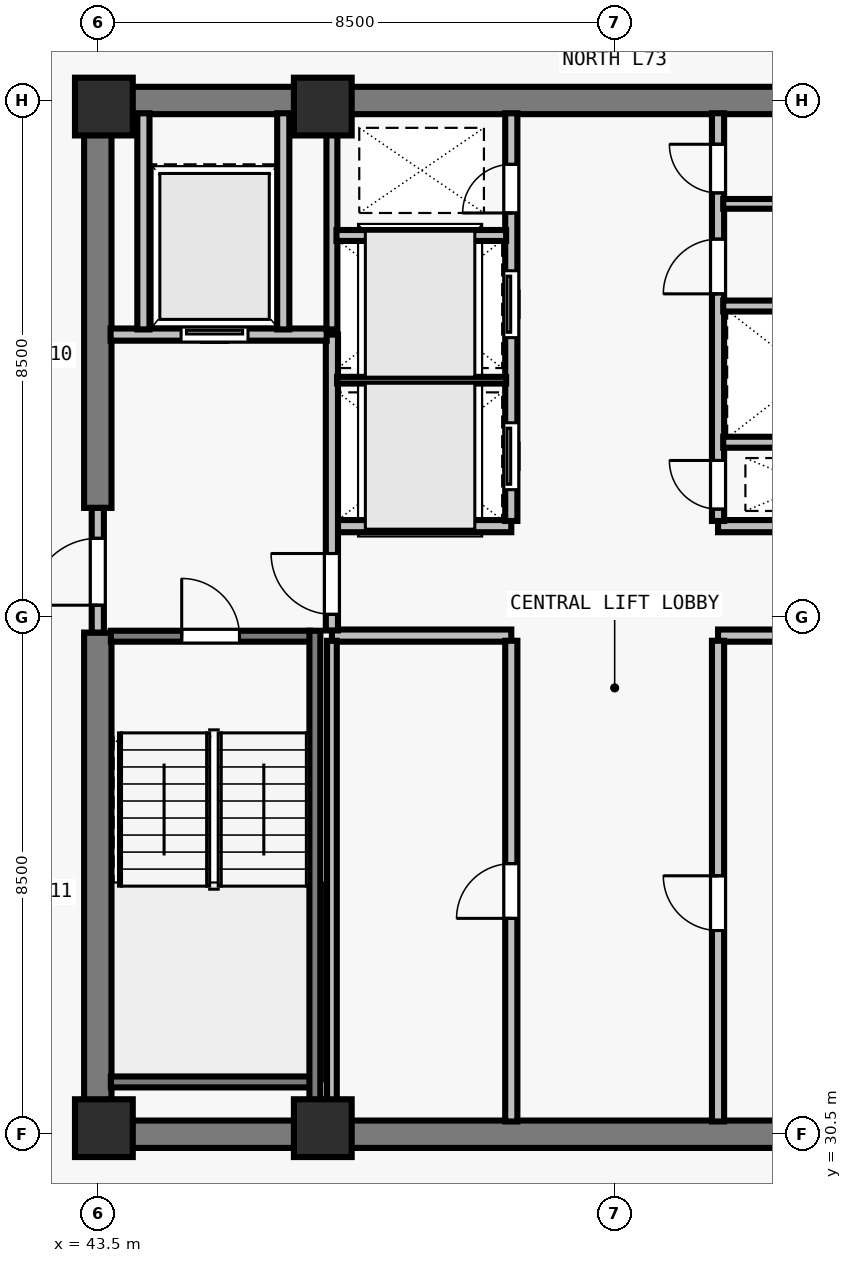
"""IFC4 building model, lengths in metres.
Left out: names, types, materials, properties, quantities, classifications, styles, units other than length and angle.
Written with IfcOpenShell. Run it as: python <this file> out.ifc"""

import sys

from ifc_helpers import new_model, si_unit, direction, frame, frame_2d, origin, origin_2d, place, context, subcontext, project, spatial, rectangle, extrude, element, fill, save


model = new_model("IFC4")
c1 = context("Model", 3, precision=1e-05, world=origin(), true_north=direction((0.0, 1.0)))
c2 = subcontext(c1, "Body", "Model", "MODEL_VIEW")
j1 = project(units=[si_unit("LENGTHUNIT", "METRE"), si_unit("PLANEANGLEUNIT", "RADIAN")], contexts=[c1])
p1 = place(None, origin())
s1 = spatial("IfcSite", under=j1, at=p1, CompositionType="ELEMENT")
p2 = place(p1, origin())
s2 = spatial("IfcBuilding", under=s1, at=p2, CompositionType="ELEMENT")
p3 = place(p2, frame((0.0, 0.0, 265.5)))
s3 = spatial("IfcBuildingStorey", under=s2, at=p3, CompositionType="ELEMENT", Elevation=265.5)
for number, where, z_axis, x_axis in (
    (1, (43.6, 30.6, 0.0), (0.0, 0.0, 1.0), (1.0, 0.0, 0.0)),
    (2, (47.2, 30.6, 0.0), (0.0, 0.0, 1.0), (1.0, 0.0, 0.0)),
    (3, (43.6, 47.4, 0.0), (0.0, 0.0, 1.0), (1.0, 0.0, 0.0)),
    (4, (47.2, 47.4, 0.0), (0.0, 0.0, 1.0), (1.0, 0.0, 0.0)),
):
    element("IfcColumn", number, at=place(p3, frame(where, z_axis=z_axis, x_axis=x_axis)), inside=s3, PredefinedType="COLUMN", context=c2, shape_type="SweptSolid", body=[
        extrude(rectangle(XDim=0.95, YDim=0.95, at=origin_2d()), origin(), (0.0, 0.0, 1.0), 3.5),
    ])
for number, where, z_axis, x_axis in (
    (5, (43.275, 30.5, 0.0), (0.0, 0.0, 1.0), (1.0, 0.0, 0.0)),
    (6, (43.275, 47.5, 0.0), (0.0, 0.0, 1.0), (1.0, 0.0, 0.0)),
):
    element("IfcWall", number, at=place(p3, frame(where, z_axis=z_axis, x_axis=x_axis)), inside=s3, PredefinedType="SHEAR", context=c2, shape_type="SweptSolid", body=[
        extrude(rectangle(XDim=17.45, YDim=0.45, at=frame_2d((8.725, 0.0))), origin(), (0.0, 0.0, 1.0), 3.29),
    ])
p4 = place(p3, frame((43.5, 30.715, 0.0), z_axis=(0.0, 0.0, 1.0), x_axis=(0.0, 1.0, 0.0)))
e7 = element("IfcWall", 7, at=p4, inside=s3, PredefinedType="SHEAR", context=c2, shape_type="SweptSolid", body=[
    extrude(rectangle(XDim=8.035, YDim=0.45, at=frame_2d((4.018, 0.0))), origin(), (0.0, 0.0, 1.0), 3.29),
])
p5 = place(p3, frame((43.5, 40.8, 0.0), z_axis=(0.0, 0.0, 1.0), x_axis=(0.0, 1.0, 0.0)))
e8 = element("IfcWall", 8, at=p5, inside=s3, PredefinedType="SHEAR", context=c2, shape_type="SweptSolid", body=[
    extrude(rectangle(XDim=6.485, YDim=0.45, at=frame_2d((3.242, 0.0))), origin(), (0.0, 0.0, 1.0), 3.29),
])
for number, where, z_axis, x_axis in (
    (9, (47.35, 38.7, 0.0), (0.0, 0.0, 1.0), (1.0, 0.0, 0.0)),
    (10, (47.35, 40.5, 0.0), (0.0, 0.0, 1.0), (1.0, 0.0, 0.0)),
    (11, (53.7, 38.7, 0.0), (0.0, 0.0, 1.0), (1.0, 0.0, 0.0)),
    (12, (53.7, 40.5, 0.0), (0.0, 0.0, 1.0), (1.0, 0.0, 0.0)),
):
    element("IfcWall", number, at=place(p3, frame(where, z_axis=z_axis, x_axis=x_axis)), inside=s3, PredefinedType="SOLIDWALL", context=c2, shape_type="SweptSolid", body=[
        extrude(rectangle(XDim=2.95, YDim=0.2, at=frame_2d((1.475, 0.0))), origin(), (0.0, 0.0, 1.0), 3.29),
    ])
p6 = place(p3, frame((50.3, 30.71, 0.0), z_axis=(0.0, 0.0, 1.0), x_axis=(0.0, 1.0, 0.0)))
e13 = element("IfcWall", 13, at=p6, inside=s3, PredefinedType="SOLIDWALL", context=c2, shape_type="SweptSolid", body=[
    extrude(rectangle(XDim=7.905, YDim=0.2, at=frame_2d((3.953, 0.0))), origin(), (0.0, 0.0, 1.0), 3.29),
])
p7 = place(p6, frame((3.34, 0.0, 0.0)))
e14 = element("IfcOpeningElement", 14, at=p7, cuts=e13, PredefinedType="OPENING", context=c2, shape_type="SweptSolid", body=[
    extrude(rectangle(XDim=0.9, YDim=2.12, at=frame_2d((0.45, 1.06))), frame((0.0, 0.11, 0.0), z_axis=(0.0, -1.0, 0.0), x_axis=(1.0, 0.0, 0.0)), (0.0, 0.0, 1.0), 0.22),
])
p8 = place(p3, frame((53.7, 30.71, 0.0), z_axis=(0.0, 0.0, 1.0), x_axis=(0.0, 1.0, 0.0)))
e15 = element("IfcWall", 15, at=p8, inside=s3, PredefinedType="SOLIDWALL", context=c2, shape_type="SweptSolid", body=[
    extrude(rectangle(XDim=7.905, YDim=0.2, at=frame_2d((3.953, 0.0))), origin(), (0.0, 0.0, 1.0), 3.29),
])
p9 = place(p8, frame((3.14, 0.0, 0.0)))
e16 = element("IfcOpeningElement", 16, at=p9, cuts=e15, PredefinedType="OPENING", context=c2, shape_type="SweptSolid", body=[
    extrude(rectangle(XDim=0.9, YDim=2.12, at=frame_2d((0.45, 1.06))), frame((0.0, 0.11, 0.0), z_axis=(0.0, -1.0, 0.0), x_axis=(1.0, 0.0, 0.0)), (0.0, 0.0, 1.0), 0.22),
])
p10 = place(p3, frame((50.3, 40.585, 0.0), z_axis=(0.0, 0.0, 1.0), x_axis=(0.0, 1.0, 0.0)))
e17 = element("IfcWall", 17, at=p10, inside=s3, PredefinedType="SOLIDWALL", context=c2, shape_type="SweptSolid", body=[
    extrude(rectangle(XDim=6.705, YDim=0.2, at=frame_2d((3.353, 0.0))), origin(), (0.0, 0.0, 1.0), 3.29),
])
p11 = place(p10, frame((0.515, 0.0, 0.0)))
e18 = element("IfcOpeningElement", 18, at=p11, cuts=e17, PredefinedType="OPENING", context=c2, shape_type="SweptSolid", body=[
    extrude(rectangle(XDim=1.1, YDim=2.2, at=frame_2d((0.55, 1.1))), frame((0.0, 0.11, 0.0), z_axis=(0.0, -1.0, 0.0), x_axis=(1.0, 0.0, 0.0)), (0.0, 0.0, 1.0), 0.22),
])
p12 = place(p10, frame((3.015, 0.0, 0.0)))
e19 = element("IfcOpeningElement", 19, at=p12, cuts=e17, PredefinedType="OPENING", context=c2, shape_type="SweptSolid", body=[
    extrude(rectangle(XDim=1.1, YDim=2.2, at=frame_2d((0.55, 1.1))), frame((0.0, 0.11, 0.0), z_axis=(0.0, -1.0, 0.0), x_axis=(1.0, 0.0, 0.0)), (0.0, 0.0, 1.0), 0.22),
])
p13 = place(p10, frame((5.065, 0.0, 0.0)))
e20 = element("IfcOpeningElement", 20, at=p13, cuts=e17, PredefinedType="OPENING", context=c2, shape_type="SweptSolid", body=[
    extrude(rectangle(XDim=0.8, YDim=2.08, at=frame_2d((0.4, 1.04))), frame((0.0, 0.11, 0.0), z_axis=(0.0, -1.0, 0.0), x_axis=(1.0, 0.0, 0.0)), (0.0, 0.0, 1.0), 0.22),
])
p14 = place(p3, frame((53.7, 40.585, 0.0), z_axis=(0.0, 0.0, 1.0), x_axis=(0.0, 1.0, 0.0)))
e21 = element("IfcWall", 21, at=p14, inside=s3, PredefinedType="SOLIDWALL", context=c2, shape_type="SweptSolid", body=[
    extrude(rectangle(XDim=6.705, YDim=0.2, at=frame_2d((3.353, 0.0))), origin(), (0.0, 0.0, 1.0), 3.29),
])
p15 = place(p14, frame((0.195, 0.0, 0.0)))
e22 = element("IfcOpeningElement", 22, at=p15, cuts=e21, PredefinedType="OPENING", context=c2, shape_type="SweptSolid", body=[
    extrude(rectangle(XDim=0.8, YDim=2.08, at=frame_2d((0.4, 1.04))), frame((0.0, 0.11, 0.0), z_axis=(0.0, -1.0, 0.0), x_axis=(1.0, 0.0, 0.0)), (0.0, 0.0, 1.0), 0.22),
])
p16 = place(p14, frame((3.735, 0.0, 0.0)))
e23 = element("IfcOpeningElement", 23, at=p16, cuts=e21, PredefinedType="OPENING", context=c2, shape_type="SweptSolid", body=[
    extrude(rectangle(XDim=0.9, YDim=2.12, at=frame_2d((0.45, 1.06))), frame((0.0, 0.11, 0.0), z_axis=(0.0, -1.0, 0.0), x_axis=(1.0, 0.0, 0.0)), (0.0, 0.0, 1.0), 0.22),
])
p17 = place(p14, frame((5.395, 0.0, 0.0)))
e24 = element("IfcOpeningElement", 24, at=p17, cuts=e21, PredefinedType="OPENING", context=c2, shape_type="SweptSolid", body=[
    extrude(rectangle(XDim=0.8, YDim=2.1, at=frame_2d((0.4, 1.05))), frame((0.0, 0.11, 0.0), z_axis=(0.0, -1.0, 0.0), x_axis=(1.0, 0.0, 0.0)), (0.0, 0.0, 1.0), 0.22),
])
p18 = place(p3, frame((43.5, 38.75, 0.0), z_axis=(0.0, 0.0, 1.0), x_axis=(0.0, 1.0, 0.0)))
e25 = element("IfcWall", 25, at=p18, inside=s3, PredefinedType="SOLIDWALL", context=c2, shape_type="SweptSolid", body=[
    extrude(rectangle(XDim=2.05, YDim=0.2, at=frame_2d((1.025, 0.0))), origin(), (0.0, 0.0, 1.0), 3.29),
])
p19 = place(p18, frame((0.45, 0.0, 0.0)))
e26 = element("IfcOpeningElement", 26, at=p19, cuts=e25, PredefinedType="OPENING", context=c2, shape_type="SweptSolid", body=[
    extrude(rectangle(XDim=1.1, YDim=2.15, at=frame_2d((0.55, 1.075))), frame((0.0, 0.11, 0.0), z_axis=(0.0, -1.0, 0.0), x_axis=(1.0, 0.0, 0.0)), (0.0, 0.0, 1.0), 0.22),
])
p20 = place(p3, frame((47.35, 38.785, 0.0), z_axis=(0.0, 0.0, 1.0), x_axis=(0.0, 1.0, 0.0)))
e27 = element("IfcWall", 27, at=p20, inside=s3, PredefinedType="SOLIDWALL", context=c2, shape_type="SweptSolid", body=[
    extrude(rectangle(XDim=4.865, YDim=0.2, at=frame_2d((2.433, 0.0))), origin(), (0.0, 0.0, 1.0), 3.29),
])
p21 = place(p20, frame((0.265, 0.0, 0.0)))
e28 = element("IfcOpeningElement", 28, at=p21, cuts=e27, PredefinedType="OPENING", context=c2, shape_type="SweptSolid", body=[
    extrude(rectangle(XDim=1.0, YDim=2.15, at=frame_2d((0.5, 1.075))), frame((0.0, 0.11, 0.0), z_axis=(0.0, -1.0, 0.0), x_axis=(1.0, 0.0, 0.0)), (0.0, 0.0, 1.0), 0.22),
])
p22 = place(p3, frame((43.71, 43.65, 0.0), z_axis=(0.0, 0.0, 1.0), x_axis=(1.0, 0.0, 0.0)))
e29 = element("IfcWall", 29, at=p22, inside=s3, PredefinedType="SOLIDWALL", context=c2, shape_type="SweptSolid", body=[
    extrude(rectangle(XDim=3.555, YDim=0.2, at=frame_2d((1.777, 0.0))), origin(), (0.0, 0.0, 1.0), 3.29),
])
p23 = place(p22, frame((1.16, 0.0, 0.0)))
e30 = element("IfcOpeningElement", 30, at=p23, cuts=e29, PredefinedType="OPENING", context=c2, shape_type="SweptSolid", body=[
    extrude(rectangle(XDim=1.1, YDim=2.2, at=frame_2d((0.55, 1.1))), frame((0.0, 0.11, 0.0), z_axis=(0.0, -1.0, 0.0), x_axis=(1.0, 0.0, 0.0)), (0.0, 0.0, 1.0), 0.22),
])
for number, where, z_axis, x_axis in (
    (31, (46.55, 43.735, 0.0), (0.0, 0.0, 1.0), (0.0, 1.0, 0.0)),
    (32, (44.25, 43.735, 0.0), (0.0, 0.0, 1.0), (0.0, 1.0, 0.0)),
):
    element("IfcWall", number, at=place(p3, frame(where, z_axis=z_axis, x_axis=x_axis)), inside=s3, PredefinedType="SOLIDWALL", context=c2, shape_type="SweptSolid", body=[
        extrude(rectangle(XDim=3.555, YDim=0.2, at=frame_2d((1.777, 0.0))), origin(), (0.0, 0.0, 1.0), 3.29),
    ])
p24 = place(p3, frame((47.35, 30.71, 0.0), z_axis=(0.0, 0.0, 1.0), x_axis=(0.0, 1.0, 0.0)))
e33 = element("IfcWall", 33, at=p24, inside=s3, PredefinedType="PARTITIONING", context=c2, shape_type="SweptSolid", body=[
    extrude(rectangle(XDim=7.905, YDim=0.16, at=frame_2d((3.953, 0.0))), origin(), (0.0, 0.0, 1.0), 3.29),
])
p25 = place(p3, frame((47.35, 43.735, 0.0), z_axis=(0.0, 0.0, 1.0), x_axis=(0.0, 1.0, 0.0)))
e34 = element("IfcWall", 34, at=p25, inside=s3, PredefinedType="SOLIDWALL", context=c2, shape_type="SweptSolid", body=[
    extrude(rectangle(XDim=3.555, YDim=0.18, at=frame_2d((1.777, 0.0))), origin(), (0.0, 0.0, 1.0), 3.29),
])
p26 = place(p3, frame((47.435, 42.9, 0.0), z_axis=(0.0, 0.0, 1.0), x_axis=(1.0, 0.0, 0.0)))
e35 = element("IfcWall", 35, at=p26, inside=s3, PredefinedType="PARTITIONING", context=c2, shape_type="SweptSolid", body=[
    extrude(rectangle(XDim=2.78, YDim=0.11, at=frame_2d((1.39, 0.0))), origin(), (0.0, 0.0, 1.0), 3.29),
])
p27 = place(p3, frame((47.425, 45.28, 0.0), z_axis=(0.0, 0.0, 1.0), x_axis=(1.0, 0.0, 0.0)))
e36 = element("IfcWall", 36, at=p27, inside=s3, PredefinedType="SOLIDWALL", context=c2, shape_type="SweptSolid", body=[
    extrude(rectangle(XDim=2.79, YDim=0.18, at=frame_2d((1.395, 0.0))), origin(), (0.0, 0.0, 1.0), 3.29),
])
p28 = place(p3, frame((53.785, 41.88, 0.0), z_axis=(0.0, 0.0, 1.0), x_axis=(1.0, 0.0, 0.0)))
e37 = element("IfcWall", 37, at=p28, inside=s3, PredefinedType="SOLIDWALL", context=c2, shape_type="SweptSolid", body=[
    extrude(rectangle(XDim=2.78, YDim=0.18, at=frame_2d((1.39, 0.0))), origin(), (0.0, 0.0, 1.0), 3.29),
])
p29 = place(p3, frame((53.785, 44.12, 0.0), z_axis=(0.0, 0.0, 1.0), x_axis=(1.0, 0.0, 0.0)))
e38 = element("IfcWall", 38, at=p29, inside=s3, PredefinedType="SOLIDWALL", context=c2, shape_type="SweptSolid", body=[
    extrude(rectangle(XDim=2.79, YDim=0.18, at=frame_2d((1.395, 0.0))), origin(), (0.0, 0.0, 1.0), 3.29),
])
p30 = place(p3, frame((53.785, 45.8, 0.0), z_axis=(0.0, 0.0, 1.0), x_axis=(1.0, 0.0, 0.0)))
e39 = element("IfcWall", 39, at=p30, inside=s3, PredefinedType="PARTITIONING", context=c2, shape_type="SweptSolid", body=[
    extrude(rectangle(XDim=2.79, YDim=0.16, at=frame_2d((1.395, 0.0))), origin(), (0.0, 0.0, 1.0), 3.29),
])
p31 = place(p3, frame((43.715, 38.69, 0.0), z_axis=(0.0, 0.0, 1.0), x_axis=(1.0, 0.0, 0.0)))
e40 = element("IfcWall", 40, at=p31, inside=s3, PredefinedType="SOLIDWALL", context=c2, shape_type="SweptSolid", body=[
    extrude(rectangle(XDim=3.28, YDim=0.18, at=frame_2d((1.64, 0.0))), origin(), (0.0, 0.0, 1.0), 3.29),
])
p32 = place(p31, frame((1.165, 0.0, 0.0)))
e41 = element("IfcOpeningElement", 41, at=p32, cuts=e40, PredefinedType="OPENING", context=c2, shape_type="SweptSolid", body=[
    extrude(rectangle(XDim=0.95, YDim=2.15, at=frame_2d((0.475, 1.075))), frame((0.0, 0.1, 0.0), z_axis=(0.0, -1.0, 0.0), x_axis=(1.0, 0.0, 0.0)), (0.0, 0.0, 1.0), 0.2),
])
p33 = place(p3, frame((43.715, 31.36, 0.0), z_axis=(0.0, 0.0, 1.0), x_axis=(1.0, 0.0, 0.0)))
e42 = element("IfcWall", 42, at=p33, inside=s3, PredefinedType="SOLIDWALL", context=c2, shape_type="SweptSolid", body=[
    extrude(rectangle(XDim=3.28, YDim=0.18, at=frame_2d((1.64, 0.0))), origin(), (0.0, 0.0, 1.0), 3.29),
])
p34 = place(p3, frame((47.07, 38.78, 0.0), z_axis=(0.0, 0.0, 1.0), x_axis=(0.0, -1.0, 0.0)))
e43 = element("IfcWall", 43, at=p34, inside=s3, PredefinedType="SOLIDWALL", context=c2, shape_type="SweptSolid", body=[
    extrude(rectangle(XDim=8.067, YDim=0.18, at=frame_2d((4.034, 0.0))), origin(), (0.0, 0.0, 1.0), 3.29),
])
p35 = place(p19, origin())
e44 = element("IfcDoor", 44, at=p35, inside=s3, OperationType="SINGLE_SWING_LEFT", PredefinedType="DOOR", context=c2, shape_type="SweptSolid", body=[
    extrude(rectangle(XDim=1.1, YDim=2.15, at=frame_2d((0.55, 1.075))), frame((0.0, 0.025, 0.0), z_axis=(0.0, -1.0, 0.0), x_axis=(1.0, 0.0, 0.0)), (0.0, 0.0, 1.0), 0.05),
])
fill(e26, e44)
p36 = place(p21, origin())
e45 = element("IfcDoor", 45, at=p36, inside=s3, OperationType="SINGLE_SWING_RIGHT", PredefinedType="DOOR", context=c2, shape_type="SweptSolid", body=[
    extrude(rectangle(XDim=1.0, YDim=2.15, at=frame_2d((0.5, 1.075))), frame((0.0, 0.025, 0.0), z_axis=(0.0, -1.0, 0.0), x_axis=(1.0, 0.0, 0.0)), (0.0, 0.0, 1.0), 0.05),
])
fill(e28, e45)
p37 = place(p23, origin())
e46 = element("IfcDoor", 46, at=p37, inside=s3, OperationType="SLIDING_TO_LEFT", PredefinedType="DOOR", context=c2, shape_type="SweptSolid", body=[
    extrude(rectangle(XDim=1.1, YDim=2.2, at=frame_2d((0.55, 1.1))), frame((0.0, 0.025, 0.0), z_axis=(0.0, -1.0, 0.0), x_axis=(1.0, 0.0, 0.0)), (0.0, 0.0, 1.0), 0.05),
])
fill(e30, e46)
p38 = place(p7, origin())
e47 = element("IfcDoor", 47, at=p38, inside=s3, OperationType="SINGLE_SWING_LEFT", PredefinedType="DOOR", context=c2, shape_type="SweptSolid", body=[
    extrude(rectangle(XDim=0.9, YDim=2.12, at=frame_2d((0.45, 1.06))), frame((0.0, 0.025, 0.0), z_axis=(0.0, -1.0, 0.0), x_axis=(1.0, 0.0, 0.0)), (0.0, 0.0, 1.0), 0.05),
])
fill(e14, e47)
p39 = place(p9, origin())
e48 = element("IfcDoor", 48, at=p39, inside=s3, OperationType="SINGLE_SWING_RIGHT", PredefinedType="DOOR", context=c2, shape_type="SweptSolid", body=[
    extrude(rectangle(XDim=0.9, YDim=2.12, at=frame_2d((0.45, 1.06))), frame((0.0, 0.025, 0.0), z_axis=(0.0, -1.0, 0.0), x_axis=(1.0, 0.0, 0.0)), (0.0, 0.0, 1.0), 0.05),
])
fill(e16, e48)
p40 = place(p11, origin())
e49 = element("IfcDoor", 49, at=p40, inside=s3, OperationType="SLIDING_TO_LEFT", PredefinedType="DOOR", context=c2, shape_type="SweptSolid", body=[
    extrude(rectangle(XDim=1.1, YDim=2.2, at=frame_2d((0.55, 1.1))), frame((0.0, 0.025, 0.0), z_axis=(0.0, -1.0, 0.0), x_axis=(1.0, 0.0, 0.0)), (0.0, 0.0, 1.0), 0.05),
])
fill(e18, e49)
p41 = place(p12, origin())
e50 = element("IfcDoor", 50, at=p41, inside=s3, OperationType="SLIDING_TO_LEFT", PredefinedType="DOOR", context=c2, shape_type="SweptSolid", body=[
    extrude(rectangle(XDim=1.1, YDim=2.2, at=frame_2d((0.55, 1.1))), frame((0.0, 0.025, 0.0), z_axis=(0.0, -1.0, 0.0), x_axis=(1.0, 0.0, 0.0)), (0.0, 0.0, 1.0), 0.05),
])
fill(e19, e50)
p42 = place(p13, origin())
e51 = element("IfcDoor", 51, at=p42, inside=s3, OperationType="SINGLE_SWING_LEFT", PredefinedType="DOOR", context=c2, shape_type="SweptSolid", body=[
    extrude(rectangle(XDim=0.8, YDim=2.08, at=frame_2d((0.4, 1.04))), frame((0.0, 0.025, 0.0), z_axis=(0.0, -1.0, 0.0), x_axis=(1.0, 0.0, 0.0)), (0.0, 0.0, 1.0), 0.05),
])
fill(e20, e51)
p43 = place(p15, origin())
e52 = element("IfcDoor", 52, at=p43, inside=s3, OperationType="SINGLE_SWING_RIGHT", PredefinedType="DOOR", context=c2, shape_type="SweptSolid", body=[
    extrude(rectangle(XDim=0.8, YDim=2.08, at=frame_2d((0.4, 1.04))), frame((0.0, 0.025, 0.0), z_axis=(0.0, -1.0, 0.0), x_axis=(1.0, 0.0, 0.0)), (0.0, 0.0, 1.0), 0.05),
])
fill(e22, e52)
p44 = place(p16, origin())
e53 = element("IfcDoor", 53, at=p44, inside=s3, OperationType="SINGLE_SWING_LEFT", PredefinedType="DOOR", context=c2, shape_type="SweptSolid", body=[
    extrude(rectangle(XDim=0.9, YDim=2.12, at=frame_2d((0.45, 1.06))), frame((0.0, 0.025, 0.0), z_axis=(0.0, -1.0, 0.0), x_axis=(1.0, 0.0, 0.0)), (0.0, 0.0, 1.0), 0.05),
])
fill(e23, e53)
p45 = place(p17, origin())
e54 = element("IfcDoor", 54, at=p45, inside=s3, OperationType="SINGLE_SWING_RIGHT", PredefinedType="DOOR", context=c2, shape_type="SweptSolid", body=[
    extrude(rectangle(XDim=0.8, YDim=2.1, at=frame_2d((0.4, 1.05))), frame((0.0, 0.025, 0.0), z_axis=(0.0, -1.0, 0.0), x_axis=(1.0, 0.0, 0.0)), (0.0, 0.0, 1.0), 0.05),
])
fill(e24, e54)
p46 = place(p32, origin())
e55 = element("IfcDoor", 55, at=p46, inside=s3, OperationType="SINGLE_SWING_LEFT", PredefinedType="DOOR", context=c2, shape_type="SweptSolid", body=[
    extrude(rectangle(XDim=0.95, YDim=2.15, at=frame_2d((0.475, 1.075))), frame((0.0, 0.025, 0.0), z_axis=(0.0, -1.0, 0.0), x_axis=(1.0, 0.0, 0.0)), (0.0, 0.0, 1.0), 0.05),
])
fill(e41, e55)
save(model, sys.argv[1])
